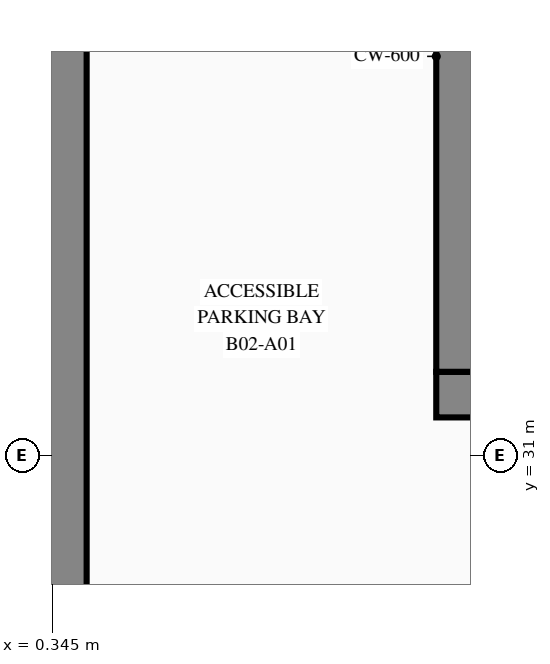
"""IFC4 building model, lengths in metres.
Left out: names, types, materials, properties, quantities, classifications, styles, units other than length and angle.
Written with IfcOpenShell. Run it as: python <this file> out.ifc"""

import sys

from ifc_helpers import new_model, si_unit, direction, frame, frame_2d, origin, place, context, subcontext, project, spatial, rectangle, extrude, element, save


model = new_model("IFC4")
c1 = context("Model", 3, precision=1e-05, world=origin(), true_north=direction((0.0, 1.0)))
c2 = subcontext(c1, "Body", "Model", "MODEL_VIEW")
j1 = project(units=[si_unit("LENGTHUNIT", "METRE"), si_unit("PLANEANGLEUNIT", "RADIAN")], contexts=[c1])
p1 = place(None, origin())
s1 = spatial("IfcSite", under=j1, at=p1, CompositionType="ELEMENT")
p2 = place(p1, origin())
s2 = spatial("IfcBuilding", under=s1, at=p2, CompositionType="ELEMENT")
p3 = place(p2, frame((0.0, 0.0, -9.0)))
s3 = spatial("IfcBuildingStorey", under=s2, at=p3, CompositionType="ELEMENT", Elevation=-9.0)
p4 = place(p3, frame((0.4, 0.8, 0.0), z_axis=(0.0, 0.0, 1.0), x_axis=(0.0, 1.0, 0.0)))
e1 = element("IfcWall", 1, at=p4, inside=s3, PredefinedType="USERDEFINED", context=c2, shape_type="SweptSolid", body=[
    extrude(rectangle(XDim=44.4, YDim=0.8, at=frame_2d((22.2, 0.0))), origin(), (0.0, 0.0, 1.0), 4.5),
])
p5 = place(p3, frame((5.4, 31.8, 0.0), z_axis=(0.0, 0.0, 1.0), x_axis=(1.0, 0.0, 0.0)))
e2 = element("IfcWall", 2, at=p5, inside=s3, PredefinedType="SHEAR", context=c2, shape_type="SweptSolid", body=[
    extrude(rectangle(XDim=18.05, YDim=0.6, at=frame_2d((9.025, 0.0))), origin(), (0.0, 0.0, 1.0), 4.5),
])
p6 = place(p5, frame((3.25, 0.0, 0.0)))
e3 = element("IfcOpeningElement", 3, at=p6, cuts=e2, PredefinedType="OPENING", context=c2, shape_type="SweptSolid", body=[
    extrude(rectangle(XDim=1.2, YDim=2.2, at=frame_2d((0.6, 1.1))), frame((0.0, 0.31, 0.0), z_axis=(0.0, -1.0, 0.0), x_axis=(1.0, 0.0, 0.0)), (0.0, 0.0, 1.0), 0.62),
])
p7 = place(p5, frame((7.1, 0.0, 0.0)))
e4 = element("IfcOpeningElement", 4, at=p7, cuts=e2, PredefinedType="OPENING", context=c2, shape_type="SweptSolid", body=[
    extrude(rectangle(XDim=1.2, YDim=2.2, at=frame_2d((0.6, 1.1))), frame((0.0, 0.31, 0.0), z_axis=(0.0, -1.0, 0.0), x_axis=(1.0, 0.0, 0.0)), (0.0, 0.0, 1.0), 0.62),
])
p8 = place(p5, frame((8.95, 0.0, 0.0)))
e5 = element("IfcOpeningElement", 5, at=p8, cuts=e2, PredefinedType="OPENING", context=c2, shape_type="SweptSolid", body=[
    extrude(rectangle(XDim=1.15, YDim=2.2, at=frame_2d((0.575, 1.1))), frame((0.0, 0.31, 0.0), z_axis=(0.0, -1.0, 0.0), x_axis=(1.0, 0.0, 0.0)), (0.0, 0.0, 1.0), 0.62),
])
p9 = place(p5, frame((16.05, 0.0, 0.0)))
e6 = element("IfcOpeningElement", 6, at=p9, cuts=e2, PredefinedType="OPENING", context=c2, shape_type="SweptSolid", body=[
    extrude(rectangle(XDim=1.2, YDim=2.2, at=frame_2d((0.6, 1.1))), frame((0.0, 0.31, 0.0), z_axis=(0.0, -1.0, 0.0), x_axis=(1.0, 0.0, 0.0)), (0.0, 0.0, 1.0), 0.62),
])
p10 = place(p3, frame((5.7, 32.1, 0.0), z_axis=(0.0, 0.0, 1.0), x_axis=(0.0, 1.0, 0.0)))
e7 = element("IfcWall", 7, at=p10, inside=s3, PredefinedType="SHEAR", context=c2, shape_type="SweptSolid", body=[
    extrude(rectangle(XDim=8.3, YDim=0.6, at=frame_2d((4.15, 0.0))), origin(), (0.0, 0.0, 1.0), 4.5),
])
save(model, sys.argv[1])
